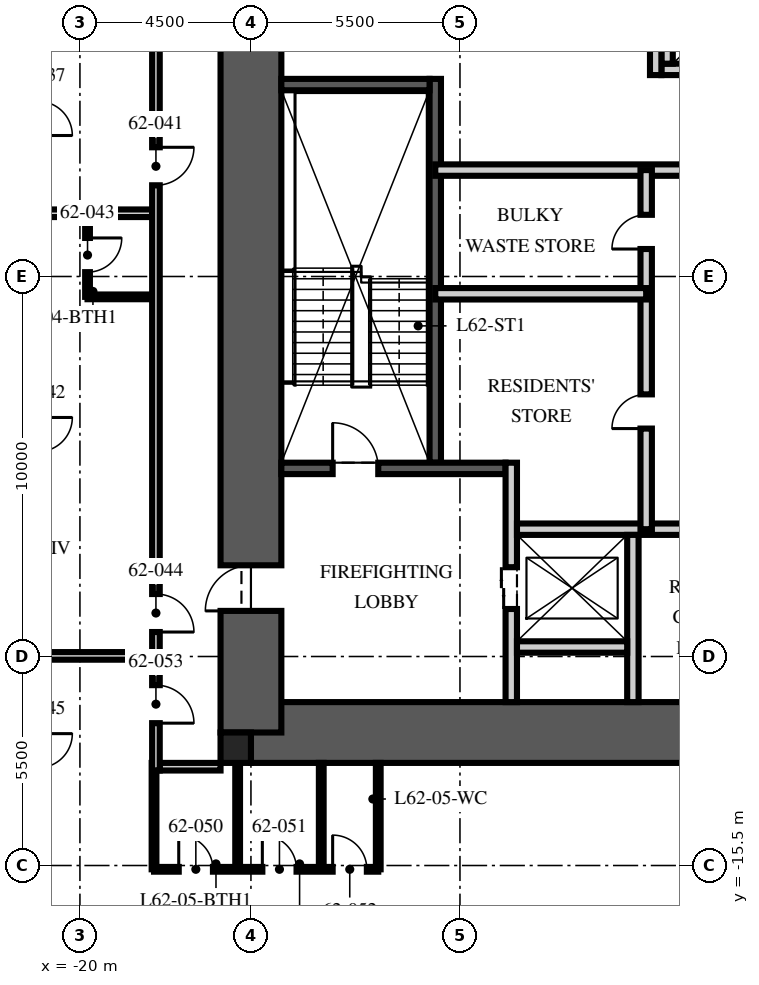
"""IFC4 building model, lengths in metres.
Left out: names, types, materials, properties, quantities, classifications, styles, units other than length and angle.
Written with IfcOpenShell. Run it as: python <this file> out.ifc"""

import sys

from ifc_helpers import new_model, si_unit, direction, frame, frame_2d, origin, origin_2d, place, context, subcontext, project, spatial, rectangle, extrude, element, fill, save


model = new_model("IFC4")
c1 = context("Model", 3, precision=1e-05, world=origin(), true_north=direction((0.0, 1.0)))
c2 = subcontext(c1, "Body", "Model", "MODEL_VIEW")
j1 = project(units=[si_unit("LENGTHUNIT", "METRE"), si_unit("PLANEANGLEUNIT", "RADIAN")], contexts=[c1])
p1 = place(None, origin())
s1 = spatial("IfcSite", under=j1, at=p1, CompositionType="ELEMENT")
p2 = place(p1, origin())
s2 = spatial("IfcBuilding", under=s1, at=p2, CompositionType="ELEMENT")
p3 = place(p2, frame((0.0, 0.0, 248.25)))
s3 = spatial("IfcBuildingStorey", under=s2, at=p3, CompositionType="ELEMENT", Elevation=248.25)
p4 = place(p3, frame((-15.5, -12.0, -0.25), z_axis=(0.0, 0.0, 1.0), x_axis=(1.0, 0.0, 0.0)))
e1 = element("IfcWall", 1, at=p4, inside=s3, PredefinedType="SHEAR", context=c2, shape_type="SweptSolid", body=[
    extrude(rectangle(XDim=31.0, YDim=1.6, at=frame_2d((15.5, 0.0))), origin(), (0.0, 0.0, 1.0), 3.75),
])
p5 = place(p3, frame((-15.5, -12.0, -0.25), z_axis=(0.0, 0.0, 1.0), x_axis=(0.0, 1.0, 0.0)))
e2 = element("IfcWall", 2, at=p5, inside=s3, PredefinedType="SHEAR", context=c2, shape_type="SweptSolid", body=[
    extrude(rectangle(XDim=24.0, YDim=1.6, at=frame_2d((12.0, 0.0))), origin(), (0.0, 0.0, 1.0), 3.75),
])
p6 = place(p5, frame((3.2, 0.0, 0.25)))
e3 = element("IfcOpeningElement", 3, at=p6, cuts=e2, PredefinedType="OPENING", context=c2, shape_type="SweptSolid", body=[
    extrude(rectangle(XDim=1.2, YDim=2.1, at=frame_2d((0.6, 1.05))), frame((0.0, 0.81, 0.0), z_axis=(0.0, -1.0, 0.0), x_axis=(1.0, 0.0, 0.0)), (0.0, 0.0, 1.0), 1.62),
])
p7 = place(p5, frame((19.3, 0.0, 0.25)))
e4 = element("IfcOpeningElement", 4, at=p7, cuts=e2, PredefinedType="OPENING", context=c2, shape_type="SweptSolid", body=[
    extrude(rectangle(XDim=1.8, YDim=2.1, at=frame_2d((0.9, 1.05))), frame((0.0, 0.81, 0.0), z_axis=(0.0, -1.0, 0.0), x_axis=(1.0, 0.0, 0.0)), (0.0, 0.0, 1.0), 1.62),
])
p8 = place(p3, frame((-15.9, -12.4, -0.25), z_axis=(0.0, 0.0, 1.0), x_axis=(1.0, 0.0, 0.0)))
e5 = element("IfcColumn", 5, at=p8, inside=s3, PredefinedType="COLUMN", context=c2, shape_type="SweptSolid", body=[
    extrude(rectangle(XDim=0.8, YDim=0.8, at=origin_2d()), origin(), (0.0, 0.0, 1.0), 3.75),
])
p9 = place(p3, frame((-10.65, -4.9, 0.0), z_axis=(0.0, 0.0, 1.0), x_axis=(0.0, 1.0, 0.0)))
e6 = element("IfcWall", 6, at=p9, inside=s3, PredefinedType="SOLIDWALL", context=c2, shape_type="SweptSolid", body=[
    extrude(rectangle(XDim=10.1, YDim=0.3, at=frame_2d((5.05, 0.0))), origin(), (0.0, 0.0, 1.0), 3.5),
])
p10 = place(p3, frame((-14.7, -5.05, 0.0), z_axis=(0.0, 0.0, 1.0), x_axis=(1.0, 0.0, 0.0)))
e7 = element("IfcWall", 7, at=p10, inside=s3, PredefinedType="SOLIDWALL", context=c2, shape_type="SweptSolid", body=[
    extrude(rectangle(XDim=5.9, YDim=0.3, at=frame_2d((2.95, 0.0))), origin(), (0.0, 0.0, 1.0), 3.5),
])
p11 = place(p10, frame((1.35, 0.0, 0.0)))
e8 = element("IfcOpeningElement", 8, at=p11, cuts=e7, PredefinedType="OPENING", context=c2, shape_type="SweptSolid", body=[
    extrude(rectangle(XDim=1.2, YDim=2.1, at=frame_2d((0.6, 1.05))), frame((0.0, 0.16, 0.0), z_axis=(0.0, -1.0, 0.0), x_axis=(1.0, 0.0, 0.0)), (0.0, 0.0, 1.0), 0.32),
])
p12 = place(p3, frame((-14.7, 5.05, 0.0), z_axis=(0.0, 0.0, 1.0), x_axis=(1.0, 0.0, 0.0)))
e9 = element("IfcWall", 9, at=p12, inside=s3, PredefinedType="SOLIDWALL", context=c2, shape_type="SweptSolid", body=[
    extrude(rectangle(XDim=3.9, YDim=0.3, at=frame_2d((1.95, 0.0))), origin(), (0.0, 0.0, 1.0), 3.5),
])
p13 = place(p3, frame((-8.65, -11.2, 0.0), z_axis=(0.0, 0.0, 1.0), x_axis=(0.0, 1.0, 0.0)))
e10 = element("IfcWall", 10, at=p13, inside=s3, PredefinedType="PARTITIONING", context=c2, shape_type="SweptSolid", body=[
    extrude(rectangle(XDim=6.3, YDim=0.3, at=frame_2d((3.15, 0.0))), origin(), (0.0, 0.0, 1.0), 3.5),
])
p14 = place(p13, frame((2.45, 0.0, 0.0)))
e11 = element("IfcOpeningElement", 11, at=p14, cuts=e10, PredefinedType="OPENING", context=c2, shape_type="SweptSolid", body=[
    extrude(rectangle(XDim=1.1, YDim=2.1, at=frame_2d((0.55, 1.05))), frame((0.0, 0.16, 0.0), z_axis=(0.0, -1.0, 0.0), x_axis=(1.0, 0.0, 0.0)), (0.0, 0.0, 1.0), 0.32),
])
p15 = place(p3, frame((-8.5, -6.65, 0.0), z_axis=(0.0, 0.0, 1.0), x_axis=(1.0, 0.0, 0.0)))
e12 = element("IfcWall", 12, at=p15, inside=s3, PredefinedType="PARTITIONING", context=c2, shape_type="SweptSolid", body=[
    extrude(rectangle(XDim=17.0, YDim=0.3, at=frame_2d((8.5, 0.0))), origin(), (0.0, 0.0, 1.0), 3.5),
])
p16 = place(p15, frame((7.8, 0.0, 0.0)))
e13 = element("IfcOpeningElement", 13, at=p16, cuts=e12, PredefinedType="OPENING", context=c2, shape_type="SweptSolid", body=[
    extrude(rectangle(XDim=1.3, YDim=2.4, at=frame_2d((0.65, 1.2))), frame((0.0, 0.16, 0.0), z_axis=(0.0, -1.0, 0.0), x_axis=(1.0, 0.0, 0.0)), (0.0, 0.0, 1.0), 0.32),
])
p17 = place(p15, frame((5.65, 0.0, 0.0)))
e14 = element("IfcOpeningElement", 14, at=p17, cuts=e12, PredefinedType="OPENING", context=c2, shape_type="SweptSolid", body=[
    extrude(rectangle(XDim=0.9, YDim=2.1, at=frame_2d((0.45, 1.05))), frame((0.0, 0.16, 0.0), z_axis=(0.0, -1.0, 0.0), x_axis=(1.0, 0.0, 0.0)), (0.0, 0.0, 1.0), 0.32),
])
p18 = place(p15, frame((10.4, 0.0, 0.0)))
e15 = element("IfcOpeningElement", 15, at=p18, cuts=e12, PredefinedType="OPENING", context=c2, shape_type="SweptSolid", body=[
    extrude(rectangle(XDim=0.9, YDim=2.1, at=frame_2d((0.45, 1.05))), frame((0.0, 0.16, 0.0), z_axis=(0.0, -1.0, 0.0), x_axis=(1.0, 0.0, 0.0)), (0.0, 0.0, 1.0), 0.32),
])
p19 = place(p3, frame((-5.45, -11.2, 0.0), z_axis=(0.0, 0.0, 1.0), x_axis=(0.0, 1.0, 0.0)))
e16 = element("IfcWall", 16, at=p19, inside=s3, PredefinedType="PARTITIONING", context=c2, shape_type="SweptSolid", body=[
    extrude(rectangle(XDim=4.4, YDim=0.3, at=frame_2d((2.2, 0.0))), origin(), (0.0, 0.0, 1.0), 3.5),
])
p20 = place(p3, frame((-8.5, -9.75, 0.0), z_axis=(0.0, 0.0, 1.0), x_axis=(1.0, 0.0, 0.0)))
e17 = element("IfcWall", 17, at=p20, inside=s3, PredefinedType="PARTITIONING", context=c2, shape_type="SweptSolid", body=[
    extrude(rectangle(XDim=2.9, YDim=0.3, at=frame_2d((1.45, 0.0))), origin(), (0.0, 0.0, 1.0), 3.5),
])
p21 = place(p3, frame((-4.7, 5.45, 0.0), z_axis=(0.0, 0.0, 1.0), x_axis=(1.0, 0.0, 0.0)))
e18 = element("IfcWall", 18, at=p21, inside=s3, PredefinedType="PARTITIONING", context=c2, shape_type="SweptSolid", body=[
    extrude(rectangle(XDim=9.7, YDim=0.3, at=frame_2d((4.85, 0.0))), origin(), (0.0, 0.0, 1.0), 3.5),
])
p22 = place(p21, frame((1.2, 0.0, 0.0)))
e19 = element("IfcOpeningElement", 19, at=p22, cuts=e18, PredefinedType="OPENING", context=c2, shape_type="SweptSolid", body=[
    extrude(rectangle(XDim=1.1, YDim=2.1, at=frame_2d((0.55, 1.05))), frame((0.0, 0.16, 0.0), z_axis=(0.0, -1.0, 0.0), x_axis=(1.0, 0.0, 0.0)), (0.0, 0.0, 1.0), 0.32),
])
p23 = place(p21, frame((4.3, 0.0, 0.0)))
e20 = element("IfcOpeningElement", 20, at=p23, cuts=e18, PredefinedType="OPENING", context=c2, shape_type="SweptSolid", body=[
    extrude(rectangle(XDim=1.1, YDim=2.1, at=frame_2d((0.55, 1.05))), frame((0.0, 0.16, 0.0), z_axis=(0.0, -1.0, 0.0), x_axis=(1.0, 0.0, 0.0)), (0.0, 0.0, 1.0), 0.32),
])
p24 = place(p21, frame((7.4, 0.0, 0.0)))
e21 = element("IfcOpeningElement", 21, at=p24, cuts=e18, PredefinedType="OPENING", context=c2, shape_type="SweptSolid", body=[
    extrude(rectangle(XDim=1.1, YDim=2.1, at=frame_2d((0.55, 1.05))), frame((0.0, 0.16, 0.0), z_axis=(0.0, -1.0, 0.0), x_axis=(1.0, 0.0, 0.0)), (0.0, 0.0, 1.0), 0.32),
])
p25 = place(p3, frame((-4.55, 5.6, 0.0), z_axis=(0.0, 0.0, 1.0), x_axis=(0.0, 1.0, 0.0)))
e22 = element("IfcWall", 22, at=p25, inside=s3, PredefinedType="PARTITIONING", context=c2, shape_type="SweptSolid", body=[
    extrude(rectangle(XDim=2.8, YDim=0.3, at=frame_2d((1.4, 0.0))), origin(), (0.0, 0.0, 1.0), 3.5),
])
p26 = place(p3, frame((-10.65, 2.8, 0.0), z_axis=(0.0, 0.0, 1.0), x_axis=(1.0, 0.0, 0.0)))
e23 = element("IfcWall", 23, at=p26, inside=s3, PredefinedType="PARTITIONING", context=c2, shape_type="SweptSolid", body=[
    extrude(rectangle(XDim=21.3, YDim=0.3, at=frame_2d((10.65, 0.0))), origin(), (0.0, 0.0, 1.0), 3.5),
])
p27 = place(p26, frame((10.05, 0.0, 0.0)))
e24 = element("IfcOpeningElement", 24, at=p27, cuts=e23, PredefinedType="OPENING", context=c2, shape_type="SweptSolid", body=[
    extrude(rectangle(XDim=1.2, YDim=2.1, at=frame_2d((0.6, 1.05))), frame((0.0, 0.16, 0.0), z_axis=(0.0, -1.0, 0.0), x_axis=(1.0, 0.0, 0.0)), (0.0, 0.0, 1.0), 0.32),
])
p28 = place(p26, frame((19.121, 0.0, 0.0)))
e25 = element("IfcOpeningElement", 25, at=p28, cuts=e23, PredefinedType="OPENING", context=c2, shape_type="SweptSolid", body=[
    extrude(rectangle(XDim=0.9, YDim=2.1, at=frame_2d((0.45, 1.05))), frame((0.0, 0.16, 0.0), z_axis=(0.0, -1.0, 0.0), x_axis=(1.0, 0.0, 0.0)), (0.0, 0.0, 1.0), 0.32),
])
p29 = place(p3, frame((-5.1, -6.65, 0.0), z_axis=(0.0, 0.0, 1.0), x_axis=(0.0, 1.0, 0.0)))
e26 = element("IfcWall", 26, at=p29, inside=s3, PredefinedType="PARTITIONING", context=c2, shape_type="SweptSolid", body=[
    extrude(rectangle(XDim=9.45, YDim=0.3, at=frame_2d((4.725, 0.0))), origin(), (0.0, 0.0, 1.0), 3.5),
])
p30 = place(p29, frame((2.648, 0.0, 0.0)))
e27 = element("IfcOpeningElement", 27, at=p30, cuts=e26, PredefinedType="OPENING", context=c2, shape_type="SweptSolid", body=[
    extrude(rectangle(XDim=0.9, YDim=2.1, at=frame_2d((0.45, 1.05))), frame((0.0, 0.16, 0.0), z_axis=(0.0, -1.0, 0.0), x_axis=(1.0, 0.0, 0.0)), (0.0, 0.0, 1.0), 0.32),
])
p31 = place(p29, frame((7.373, 0.0, 0.0)))
e28 = element("IfcOpeningElement", 28, at=p31, cuts=e26, PredefinedType="OPENING", context=c2, shape_type="SweptSolid", body=[
    extrude(rectangle(XDim=0.9, YDim=2.1, at=frame_2d((0.45, 1.05))), frame((0.0, 0.16, 0.0), z_axis=(0.0, -1.0, 0.0), x_axis=(1.0, 0.0, 0.0)), (0.0, 0.0, 1.0), 0.32),
])
p32 = place(p3, frame((-10.65, -0.455, 0.0), z_axis=(0.0, 0.0, 1.0), x_axis=(1.0, 0.0, 0.0)))
e29 = element("IfcWall", 29, at=p32, inside=s3, PredefinedType="PARTITIONING", context=c2, shape_type="SweptSolid", body=[
    extrude(rectangle(XDim=5.55, YDim=0.3, at=frame_2d((2.775, 0.0))), origin(), (0.0, 0.0, 1.0), 3.5),
])
p33 = place(p3, frame((-4.85, 5.3, 0.0), z_axis=(0.0, 0.0, 1.0), x_axis=(0.0, 1.0, 0.0)))
e30 = element("IfcWall", 30, at=p33, inside=s3, PredefinedType="PARTITIONING", context=c2, shape_type="SweptSolid", body=[
    extrude(rectangle(XDim=5.9, YDim=0.3, at=frame_2d((2.95, 0.0))), origin(), (0.0, 0.0, 1.0), 3.5),
])
p34 = place(p33, frame((4.15, 0.0, 0.0)))
e31 = element("IfcOpeningElement", 31, at=p34, cuts=e30, PredefinedType="OPENING", context=c2, shape_type="SweptSolid", body=[
    extrude(rectangle(XDim=0.9, YDim=2.1, at=frame_2d((0.45, 1.05))), frame((0.0, 0.16, 0.0), z_axis=(0.0, -1.0, 0.0), x_axis=(1.0, 0.0, 0.0)), (0.0, 0.0, 1.0), 0.32),
])
p35 = place(p3, frame((-16.3, -12.9, 0.0), z_axis=(0.0, 0.0, 1.0), x_axis=(-1.0, 0.0, 0.0)))
e32 = element("IfcWall", 32, at=p35, inside=s3, PredefinedType="PARTITIONING", context=c2, shape_type="SweptSolid", body=[
    extrude(rectangle(XDim=1.6, YDim=0.2, at=frame_2d((0.8, 0.0))), origin(), (0.0, 0.0, 1.0), 2.3),
])
for number, where, z_axis, x_axis in (
    (33, (-18.1, 1.664, 0.0), (0.0, 0.0, 1.0), (-1.0, 0.0, 0.0)),
    (34, (-18.1, -9.984, 0.0), (0.0, 0.0, 1.0), (-1.0, 0.0, 0.0)),
):
    element("IfcWall", number, at=place(p3, frame(where, z_axis=z_axis, x_axis=x_axis)), inside=s3, PredefinedType="PARTITIONING", context=c2, shape_type="SweptSolid", body=[
        extrude(rectangle(XDim=7.6, YDim=0.2, at=frame_2d((3.8, 0.0))), origin(), (0.0, 0.0, 1.0), 2.91),
    ])
p36 = place(p3, frame((-19.8, 1.664, 0.0), z_axis=(0.0, 0.0, 1.0), x_axis=(0.0, -1.0, 0.0)))
e35 = element("IfcWall", 35, at=p36, inside=s3, PredefinedType="PARTITIONING", context=c2, shape_type="SweptSolid", body=[
    extrude(rectangle(XDim=2.2, YDim=0.125, at=frame_2d((1.1, 0.0))), origin(), (0.0, 0.0, 1.0), 2.6),
])
p37 = place(p36, frame((0.65, 0.0, 0.0)))
e36 = element("IfcOpeningElement", 36, at=p37, cuts=e35, PredefinedType="OPENING", context=c2, shape_type="SweptSolid", body=[
    extrude(rectangle(XDim=0.9, YDim=2.1, at=frame_2d((0.45, 1.05))), frame((0.0, 0.073, 0.0), z_axis=(0.0, -1.0, 0.0), x_axis=(1.0, 0.0, 0.0)), (0.0, 0.0, 1.0), 0.145),
])
p38 = place(p3, frame((-18.1, -0.536, 0.0), z_axis=(0.0, 0.0, 1.0), x_axis=(-1.0, 0.0, 0.0)))
e37 = element("IfcWall", 37, at=p38, inside=s3, PredefinedType="PARTITIONING", context=c2, shape_type="SweptSolid", body=[
    extrude(rectangle(XDim=1.7, YDim=0.125, at=frame_2d((0.85, 0.0))), origin(), (0.0, 0.0, 1.0), 3.5),
])
p39 = place(p3, frame((-18.05, -15.6, 0.0), z_axis=(0.0, 0.0, 1.0), x_axis=(1.0, 0.0, 0.0)))
e38 = element("IfcWall", 38, at=p39, inside=s3, PredefinedType="PARTITIONING", context=c2, shape_type="SweptSolid", body=[
    extrude(rectangle(XDim=5.9, YDim=0.125, at=frame_2d((2.95, 0.0))), origin(), (0.0, 0.0, 1.0), 2.3),
])
p40 = place(p39, frame((0.65, 0.0, 0.0)))
e39 = element("IfcOpeningElement", 39, at=p40, cuts=e38, PredefinedType="OPENING", context=c2, shape_type="SweptSolid", body=[
    extrude(rectangle(XDim=0.9, YDim=2.1, at=frame_2d((0.45, 1.05))), frame((0.0, 0.073, 0.0), z_axis=(0.0, -1.0, 0.0), x_axis=(1.0, 0.0, 0.0)), (0.0, 0.0, 1.0), 0.145),
])
p41 = place(p39, frame((2.85, 0.0, 0.0)))
e40 = element("IfcOpeningElement", 40, at=p41, cuts=e38, PredefinedType="OPENING", context=c2, shape_type="SweptSolid", body=[
    extrude(rectangle(XDim=0.9, YDim=2.1, at=frame_2d((0.45, 1.05))), frame((0.0, 0.073, 0.0), z_axis=(0.0, -1.0, 0.0), x_axis=(1.0, 0.0, 0.0)), (0.0, 0.0, 1.0), 0.145),
])
p42 = place(p39, frame((4.7, 0.0, 0.0)))
e41 = element("IfcOpeningElement", 41, at=p42, cuts=e38, PredefinedType="OPENING", context=c2, shape_type="SweptSolid", body=[
    extrude(rectangle(XDim=0.9, YDim=2.1, at=frame_2d((0.45, 1.05))), frame((0.0, 0.073, 0.0), z_axis=(0.0, -1.0, 0.0), x_axis=(1.0, 0.0, 0.0)), (0.0, 0.0, 1.0), 0.145),
])
for number, where, z_axis, x_axis in (
    (42, (-18.05, -12.8, 0.0), (0.0, 0.0, 1.0), (0.0, -1.0, 0.0)),
    (43, (-15.85, -12.8, 0.0), (0.0, 0.0, 1.0), (0.0, -1.0, 0.0)),
):
    element("IfcWall", number, at=place(p3, frame(where, z_axis=z_axis, x_axis=x_axis)), inside=s3, PredefinedType="PARTITIONING", context=c2, shape_type="SweptSolid", body=[
        extrude(rectangle(XDim=2.8, YDim=0.125, at=frame_2d((1.4, 0.0))), origin(), (0.0, 0.0, 1.0), 2.3),
    ])
for number, where, z_axis, x_axis in (
    (44, (-13.65, -12.8, 0.0), (0.0, 0.0, 1.0), (0.0, -1.0, 0.0)),
    (45, (-12.15, -12.8, 0.0), (0.0, 0.0, 1.0), (0.0, -1.0, 0.0)),
):
    element("IfcWall", number, at=place(p3, frame(where, z_axis=z_axis, x_axis=x_axis)), inside=s3, PredefinedType="PARTITIONING", context=c2, shape_type="SweptSolid", body=[
        extrude(rectangle(XDim=2.8, YDim=0.125, at=frame_2d((1.4, 0.0))), origin(), (0.0, 0.0, 1.0), 3.5),
    ])
p43 = place(p3, frame((-18.0, 12.8, 0.0), z_axis=(0.0, 0.0, 1.0), x_axis=(0.0, -1.0, 0.0)))
e46 = element("IfcWall", 46, at=p43, inside=s3, PredefinedType="PARTITIONING", context=c2, shape_type="SweptSolid", body=[
    extrude(rectangle(XDim=25.8, YDim=0.2, at=frame_2d((12.9, 0.0))), origin(), (0.0, 0.0, 1.0), 2.6),
])
p44 = place(p43, frame((9.4, 0.0, 0.0)))
e47 = element("IfcOpeningElement", 47, at=p44, cuts=e46, PredefinedType="OPENING", context=c2, shape_type="SweptSolid", body=[
    extrude(rectangle(XDim=1.0, YDim=2.2, at=frame_2d((0.5, 1.1))), frame((0.0, 0.11, 0.0), z_axis=(0.0, -1.0, 0.0), x_axis=(1.0, 0.0, 0.0)), (0.0, 0.0, 1.0), 0.22),
])
p45 = place(p43, frame((21.156, 0.0, 0.0)))
e48 = element("IfcOpeningElement", 48, at=p45, cuts=e46, PredefinedType="OPENING", context=c2, shape_type="SweptSolid", body=[
    extrude(rectangle(XDim=1.0, YDim=2.2, at=frame_2d((0.5, 1.1))), frame((0.0, 0.11, 0.0), z_axis=(0.0, -1.0, 0.0), x_axis=(1.0, 0.0, 0.0)), (0.0, 0.0, 1.0), 0.22),
])
p46 = place(p43, frame((23.554, 0.0, 0.0)))
e49 = element("IfcOpeningElement", 49, at=p46, cuts=e46, PredefinedType="OPENING", context=c2, shape_type="SweptSolid", body=[
    extrude(rectangle(XDim=1.0, YDim=2.2, at=frame_2d((0.5, 1.1))), frame((0.0, 0.11, 0.0), z_axis=(0.0, -1.0, 0.0), x_axis=(1.0, 0.0, 0.0)), (0.0, 0.0, 1.0), 0.22),
])
p47 = place(p11, origin())
e50 = element("IfcDoor", 50, at=p47, inside=s3, OperationType="SINGLE_SWING_LEFT", PredefinedType="DOOR", context=c2, shape_type="SweptSolid", body=[
    extrude(rectangle(XDim=1.2, YDim=2.1, at=frame_2d((0.6, 1.05))), frame((0.0, 0.025, 0.0), z_axis=(0.0, -1.0, 0.0), x_axis=(1.0, 0.0, 0.0)), (0.0, 0.0, 1.0), 0.05),
])
fill(e8, e50)
p48 = place(p6, origin())
e51 = element("IfcDoor", 51, at=p48, inside=s3, OperationType="SINGLE_SWING_LEFT", PredefinedType="DOOR", context=c2, shape_type="SweptSolid", body=[
    extrude(rectangle(XDim=1.2, YDim=2.1, at=frame_2d((0.6, 1.05))), frame((0.0, 0.025, 0.0), z_axis=(0.0, -1.0, 0.0), x_axis=(1.0, 0.0, 0.0)), (0.0, 0.0, 1.0), 0.05),
])
fill(e3, e51)
p49 = place(p14, origin())
e52 = element("IfcDoor", 52, at=p49, inside=s3, OperationType="DOUBLE_DOOR_SLIDING", PredefinedType="DOOR", context=c2, shape_type="SweptSolid", body=[
    extrude(rectangle(XDim=1.1, YDim=2.1, at=frame_2d((0.55, 1.05))), frame((0.0, 0.025, 0.0), z_axis=(0.0, -1.0, 0.0), x_axis=(1.0, 0.0, 0.0)), (0.0, 0.0, 1.0), 0.05),
])
fill(e11, e52)
p50 = place(p30, origin())
e53 = element("IfcDoor", 53, at=p50, inside=s3, OperationType="SINGLE_SWING_LEFT", PredefinedType="DOOR", context=c2, shape_type="SweptSolid", body=[
    extrude(rectangle(XDim=0.9, YDim=2.1, at=frame_2d((0.45, 1.05))), frame((0.0, 0.025, 0.0), z_axis=(0.0, -1.0, 0.0), x_axis=(1.0, 0.0, 0.0)), (0.0, 0.0, 1.0), 0.05),
])
fill(e27, e53)
p51 = place(p31, origin())
e54 = element("IfcDoor", 54, at=p51, inside=s3, OperationType="SINGLE_SWING_LEFT", PredefinedType="DOOR", context=c2, shape_type="SweptSolid", body=[
    extrude(rectangle(XDim=0.9, YDim=2.1, at=frame_2d((0.45, 1.05))), frame((0.0, 0.025, 0.0), z_axis=(0.0, -1.0, 0.0), x_axis=(1.0, 0.0, 0.0)), (0.0, 0.0, 1.0), 0.05),
])
fill(e28, e54)
p52 = place(p44, origin())
e55 = element("IfcDoor", 55, at=p52, inside=s3, OperationType="SINGLE_SWING_LEFT", PredefinedType="DOOR", context=c2, shape_type="SweptSolid", body=[
    extrude(rectangle(XDim=1.0, YDim=2.2, at=frame_2d((0.5, 1.1))), frame((0.0, 0.025, 0.0), z_axis=(0.0, -1.0, 0.0), x_axis=(1.0, 0.0, 0.0)), (0.0, 0.0, 1.0), 0.05),
])
fill(e47, e55)
p53 = place(p37, origin())
e56 = element("IfcDoor", 56, at=p53, inside=s3, OperationType="SINGLE_SWING_LEFT", PredefinedType="DOOR", context=c2, shape_type="SweptSolid", body=[
    extrude(rectangle(XDim=0.9, YDim=2.1, at=frame_2d((0.45, 1.05))), frame((0.0, 0.025, 0.0), z_axis=(0.0, -1.0, 0.0), x_axis=(1.0, 0.0, 0.0)), (0.0, 0.0, 1.0), 0.05),
])
fill(e36, e56)
p54 = place(p45, origin())
e57 = element("IfcDoor", 57, at=p54, inside=s3, OperationType="SINGLE_SWING_RIGHT", PredefinedType="DOOR", context=c2, shape_type="SweptSolid", body=[
    extrude(rectangle(XDim=1.0, YDim=2.2, at=frame_2d((0.5, 1.1))), frame((0.0, 0.025, 0.0), z_axis=(0.0, -1.0, 0.0), x_axis=(1.0, 0.0, 0.0)), (0.0, 0.0, 1.0), 0.05),
])
fill(e48, e57)
p55 = place(p40, origin())
e58 = element("IfcDoor", 58, at=p55, inside=s3, OperationType="SINGLE_SWING_LEFT", PredefinedType="DOOR", context=c2, shape_type="SweptSolid", body=[
    extrude(rectangle(XDim=0.9, YDim=2.1, at=frame_2d((0.45, 1.05))), frame((0.0, 0.025, 0.0), z_axis=(0.0, -1.0, 0.0), x_axis=(1.0, 0.0, 0.0)), (0.0, 0.0, 1.0), 0.05),
])
fill(e39, e58)
p56 = place(p41, origin())
e59 = element("IfcDoor", 59, at=p56, inside=s3, OperationType="SINGLE_SWING_LEFT", PredefinedType="DOOR", context=c2, shape_type="SweptSolid", body=[
    extrude(rectangle(XDim=0.9, YDim=2.1, at=frame_2d((0.45, 1.05))), frame((0.0, 0.025, 0.0), z_axis=(0.0, -1.0, 0.0), x_axis=(1.0, 0.0, 0.0)), (0.0, 0.0, 1.0), 0.05),
])
fill(e40, e59)
p57 = place(p42, origin())
e60 = element("IfcDoor", 60, at=p57, inside=s3, OperationType="SINGLE_SWING_LEFT", PredefinedType="DOOR", context=c2, shape_type="SweptSolid", body=[
    extrude(rectangle(XDim=0.9, YDim=2.1, at=frame_2d((0.45, 1.05))), frame((0.0, 0.025, 0.0), z_axis=(0.0, -1.0, 0.0), x_axis=(1.0, 0.0, 0.0)), (0.0, 0.0, 1.0), 0.05),
])
fill(e41, e60)
p58 = place(p46, origin())
e61 = element("IfcDoor", 61, at=p58, inside=s3, OperationType="SINGLE_SWING_RIGHT", PredefinedType="DOOR", context=c2, shape_type="SweptSolid", body=[
    extrude(rectangle(XDim=1.0, YDim=2.2, at=frame_2d((0.5, 1.1))), frame((0.0, 0.025, 0.0), z_axis=(0.0, -1.0, 0.0), x_axis=(1.0, 0.0, 0.0)), (0.0, 0.0, 1.0), 0.05),
])
fill(e49, e61)
save(model, sys.argv[1])
